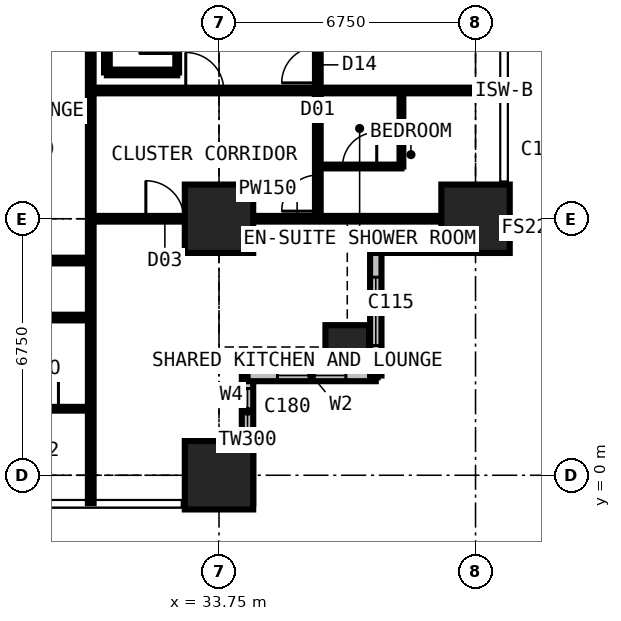
"""IFC4 building model, lengths in metres.
Left out: names, types, materials, properties, quantities, classifications, styles, units other than length and angle.
Written with IfcOpenShell. Run it as: python <this file> out.ifc"""

import sys

from ifc_helpers import new_model, si_unit, direction, frame, frame_2d, origin, origin_2d, place, context, subcontext, project, spatial, rectangle, extrude, element, fill, save


model = new_model("IFC4")
c1 = context("Model", 3, precision=1e-05, world=origin(), true_north=direction((0.0, 1.0)))
c2 = subcontext(c1, "Body", "Model", "MODEL_VIEW")
j1 = project(units=[si_unit("LENGTHUNIT", "METRE"), si_unit("PLANEANGLEUNIT", "RADIAN")], contexts=[c1])
p1 = place(None, origin())
s1 = spatial("IfcSite", under=j1, at=p1, CompositionType="ELEMENT")
p2 = place(p1, origin())
s2 = spatial("IfcBuilding", under=s1, at=p2, CompositionType="ELEMENT")
p3 = place(p2, frame((0.0, 0.0, 94.5)))
s3 = spatial("IfcBuildingStorey", under=s2, at=p3, CompositionType="ELEMENT", Elevation=94.5)
for number, where, z_axis, x_axis in (
    (1, (33.75, 0.0, 0.0), (0.0, 0.0, 1.0), (1.0, 0.0, 0.0)),
    (2, (33.75, 6.75, 0.0), (0.0, 0.0, 1.0), (1.0, 0.0, 0.0)),
):
    element("IfcColumn", number, at=place(p3, frame(where, z_axis=z_axis, x_axis=x_axis)), inside=s3, PredefinedType="COLUMN", context=c2, shape_type="SweptSolid", body=[
        extrude(rectangle(XDim=1.8, YDim=1.8, at=origin_2d()), origin(), (0.0, 0.0, 1.0), 3.6),
    ])
p4 = place(p3, frame((37.125, 3.375, 0.0), z_axis=(0.0, 0.0, 1.0), x_axis=(1.0, 0.0, 0.0)))
e3 = element("IfcColumn", 3, at=p4, inside=s3, PredefinedType="COLUMN", context=c2, shape_type="SweptSolid", body=[
    extrude(rectangle(XDim=1.15, YDim=1.15, at=origin_2d()), origin(), (0.0, 0.0, 1.0), 3.6),
])
p5 = place(p3, frame((40.5, 6.75, 0.0), z_axis=(0.0, 0.0, 1.0), x_axis=(1.0, 0.0, 0.0)))
e4 = element("IfcColumn", 4, at=p5, inside=s3, PredefinedType="COLUMN", context=c2, shape_type="SweptSolid", body=[
    extrude(rectangle(XDim=1.8, YDim=1.8, at=origin_2d()), origin(), (0.0, 0.0, 1.0), 3.6),
])
p6 = place(p3, frame((34.5, -0.75, 0.0), z_axis=(0.0, 0.0, 1.0), x_axis=(0.0, 1.0, 0.0)))
e5 = element("IfcWall", 5, at=p6, inside=s3, PredefinedType="SOLIDWALL", context=c2, shape_type="SweptSolid", body=[
    extrude(rectangle(XDim=3.375, YDim=0.3, at=frame_2d((1.688, 0.0))), origin(), (0.0, 0.0, 1.0), 3.375),
])
p7 = place(p6, frame((1.833, 0.0, 0.9)))
e6 = element("IfcOpeningElement", 6, at=p7, cuts=e5, PredefinedType="OPENING", context=c2, shape_type="SweptSolid", body=[
    extrude(rectangle(XDim=1.2, YDim=1.8, at=frame_2d((0.6, 0.9))), frame((0.0, 0.16, 0.0), z_axis=(0.0, -1.0, 0.0), x_axis=(1.0, 0.0, 0.0)), (0.0, 0.0, 1.0), 0.32),
])
p8 = place(p3, frame((34.5, 2.625, 0.0), z_axis=(0.0, 0.0, 1.0), x_axis=(1.0, 0.0, 0.0)))
e7 = element("IfcWall", 7, at=p8, inside=s3, PredefinedType="SOLIDWALL", context=c2, shape_type="SweptSolid", body=[
    extrude(rectangle(XDim=3.375, YDim=0.3, at=frame_2d((1.688, 0.0))), origin(), (0.0, 0.0, 1.0), 3.375),
])
p9 = place(p8, frame((0.788, 0.0, 0.6)))
e8 = element("IfcOpeningElement", 8, at=p9, cuts=e7, PredefinedType="OPENING", context=c2, shape_type="SweptSolid", body=[
    extrude(rectangle(XDim=1.8, YDim=2.1, at=frame_2d((0.9, 1.05))), frame((0.0, 0.16, 0.0), z_axis=(0.0, -1.0, 0.0), x_axis=(1.0, 0.0, 0.0)), (0.0, 0.0, 1.0), 0.32),
])
p10 = place(p3, frame((37.875, 2.625, 0.0), z_axis=(0.0, 0.0, 1.0), x_axis=(0.0, 1.0, 0.0)))
e9 = element("IfcWall", 9, at=p10, inside=s3, PredefinedType="SOLIDWALL", context=c2, shape_type="SweptSolid", body=[
    extrude(rectangle(XDim=3.375, YDim=0.3, at=frame_2d((1.688, 0.0))), origin(), (0.0, 0.0, 1.0), 3.375),
])
p11 = place(p10, frame((0.788, 0.0, 0.6)))
e10 = element("IfcOpeningElement", 10, at=p11, cuts=e9, PredefinedType="OPENING", context=c2, shape_type="SweptSolid", body=[
    extrude(rectangle(XDim=1.8, YDim=2.1, at=frame_2d((0.9, 1.05))), frame((0.0, 0.16, 0.0), z_axis=(0.0, -1.0, 0.0), x_axis=(1.0, 0.0, 0.0)), (0.0, 0.0, 1.0), 0.32),
])
p12 = place(p3, frame((37.875, 6.0, 0.0), z_axis=(0.0, 0.0, 1.0), x_axis=(1.0, 0.0, 0.0)))
e11 = element("IfcWall", 11, at=p12, inside=s3, PredefinedType="SOLIDWALL", context=c2, shape_type="SweptSolid", body=[
    extrude(rectangle(XDim=3.375, YDim=0.3, at=frame_2d((1.688, 0.0))), origin(), (0.0, 0.0, 1.0), 3.375),
])
p13 = place(p12, frame((0.343, 0.0, 0.9)))
e12 = element("IfcOpeningElement", 12, at=p13, cuts=e11, PredefinedType="OPENING", context=c2, shape_type="SweptSolid", body=[
    extrude(rectangle(XDim=1.2, YDim=1.8, at=frame_2d((0.6, 0.9))), frame((0.0, 0.16, 0.0), z_axis=(0.0, -1.0, 0.0), x_axis=(1.0, 0.0, 0.0)), (0.0, 0.0, 1.0), 0.32),
])
p14 = place(p3, frame((6.75, 4.15, 0.0), z_axis=(0.0, 0.0, 1.0), x_axis=(1.0, 0.0, 0.0)))
e13 = element("IfcWall", 13, at=p14, inside=s3, PredefinedType="PARTITIONING", context=c2, shape_type="SweptSolid", body=[
    extrude(rectangle(XDim=23.625, YDim=0.15, at=frame_2d((11.812, 0.0))), origin(), (0.0, 0.0, 1.0), 3.375),
])
p15 = place(p14, frame((2.85, 0.0, 0.0)))
e14 = element("IfcOpeningElement", 14, at=p15, cuts=e13, PredefinedType="OPENING", context=c2, shape_type="SweptSolid", body=[
    extrude(rectangle(XDim=1.0, YDim=2.2, at=frame_2d((0.5, 1.1))), frame((0.0, 0.085, 0.0), z_axis=(0.0, -1.0, 0.0), x_axis=(1.0, 0.0, 0.0)), (0.0, 0.0, 1.0), 0.17),
])
p16 = place(p14, frame((18.475, 0.0, 0.0)))
e15 = element("IfcOpeningElement", 15, at=p16, cuts=e13, PredefinedType="OPENING", context=c2, shape_type="SweptSolid", body=[
    extrude(rectangle(XDim=0.95, YDim=2.2, at=frame_2d((0.475, 1.1))), frame((0.0, 0.085, 0.0), z_axis=(0.0, -1.0, 0.0), x_axis=(1.0, 0.0, 0.0)), (0.0, 0.0, 1.0), 0.17),
])
p17 = place(p14, frame((11.725, 0.0, 0.0)))
e16 = element("IfcOpeningElement", 16, at=p17, cuts=e13, PredefinedType="OPENING", context=c2, shape_type="SweptSolid", body=[
    extrude(rectangle(XDim=0.95, YDim=2.2, at=frame_2d((0.475, 1.1))), frame((0.0, 0.085, 0.0), z_axis=(0.0, -1.0, 0.0), x_axis=(1.0, 0.0, 0.0)), (0.0, 0.0, 1.0), 0.17),
])
p18 = place(p14, frame((6.95, 0.0, 0.0)))
e17 = element("IfcOpeningElement", 17, at=p18, cuts=e13, PredefinedType="OPENING", context=c2, shape_type="SweptSolid", body=[
    extrude(rectangle(XDim=0.95, YDim=2.2, at=frame_2d((0.475, 1.1))), frame((0.0, 0.085, 0.0), z_axis=(0.0, -1.0, 0.0), x_axis=(1.0, 0.0, 0.0)), (0.0, 0.0, 1.0), 0.17),
])
p19 = place(p3, frame((22.988, 5.65, 0.0), z_axis=(0.0, 0.0, 1.0), x_axis=(1.0, 0.0, 0.0)))
e18 = element("IfcWall", 18, at=p19, inside=s3, PredefinedType="PARTITIONING", context=c2, shape_type="SweptSolid", body=[
    extrude(rectangle(XDim=7.387, YDim=0.15, at=frame_2d((3.694, 0.0))), origin(), (0.0, 0.0, 1.0), 3.375),
])
p20 = place(p19, frame((2.15, 0.0, 0.0)))
e19 = element("IfcOpeningElement", 19, at=p20, cuts=e18, PredefinedType="OPENING", context=c2, shape_type="SweptSolid", body=[
    extrude(rectangle(XDim=0.95, YDim=2.2, at=frame_2d((0.475, 1.1))), frame((0.0, 0.085, 0.0), z_axis=(0.0, -1.0, 0.0), x_axis=(1.0, 0.0, 0.0)), (0.0, 0.0, 1.0), 0.17),
])
p21 = place(p3, frame((27.775, 1.75, 0.0), z_axis=(0.0, 0.0, 1.0), x_axis=(1.0, 0.0, 0.0)))
e20 = element("IfcWall", 20, at=p21, inside=s3, PredefinedType="PARTITIONING", context=c2, shape_type="SweptSolid", body=[
    extrude(rectangle(XDim=2.6, YDim=0.1, at=frame_2d((1.3, 0.0))), origin(), (0.0, 0.0, 1.0), 3.375),
])
p22 = place(p21, frame((0.85, 0.0, 0.0)))
e21 = element("IfcOpeningElement", 21, at=p22, cuts=e20, PredefinedType="OPENING", context=c2, shape_type="SweptSolid", body=[
    extrude(rectangle(XDim=0.9, YDim=2.2, at=frame_2d((0.45, 1.1))), frame((0.0, 0.06, 0.0), z_axis=(0.0, -1.0, 0.0), x_axis=(1.0, 0.0, 0.0)), (0.0, 0.0, 1.0), 0.12),
])
p23 = place(p3, frame((30.375, -0.734, 0.0), z_axis=(0.0, 0.0, 1.0), x_axis=(0.0, 1.0, 0.0)))
e22 = element("IfcWall", 22, at=p23, inside=s3, PredefinedType="PARTITIONING", context=c2, shape_type="SweptSolid", body=[
    extrude(rectangle(XDim=12.034, YDim=0.15, at=frame_2d((6.017, 0.0))), origin(), (0.0, 0.0, 1.0), 3.375),
])
p24 = place(p3, frame((30.375, 6.75, 0.0), z_axis=(0.0, 0.0, 1.0), x_axis=(1.0, 0.0, 0.0)))
e23 = element("IfcWall", 23, at=p24, inside=s3, PredefinedType="PARTITIONING", context=c2, shape_type="SweptSolid", body=[
    extrude(rectangle(XDim=10.859, YDim=0.15, at=frame_2d((5.429, 0.0))), origin(), (0.0, 0.0, 1.0), 2.877),
])
p25 = place(p24, frame((1.45, 0.0, 0.0)))
e24 = element("IfcOpeningElement", 24, at=p25, cuts=e23, PredefinedType="OPENING", context=c2, shape_type="SweptSolid", body=[
    extrude(rectangle(XDim=1.0, YDim=2.2, at=frame_2d((0.5, 1.1))), frame((0.0, 0.085, 0.0), z_axis=(0.0, -1.0, 0.0), x_axis=(1.0, 0.0, 0.0)), (0.0, 0.0, 1.0), 0.17),
])
p26 = place(p3, frame((30.375, 10.125, 0.0), z_axis=(0.0, 0.0, 1.0), x_axis=(1.0, 0.0, 0.0)))
e25 = element("IfcWall", 25, at=p26, inside=s3, PredefinedType="PARTITIONING", context=c2, shape_type="SweptSolid", body=[
    extrude(rectangle(XDim=10.859, YDim=0.15, at=frame_2d((5.429, 0.0))), origin(), (0.0, 0.0, 1.0), 3.375),
])
p27 = place(p26, frame((2.5, 0.0, 0.0)))
e26 = element("IfcOpeningElement", 26, at=p27, cuts=e25, PredefinedType="OPENING", context=c2, shape_type="SweptSolid", body=[
    extrude(rectangle(XDim=1.0, YDim=2.2, at=frame_2d((0.5, 1.1))), frame((0.0, 0.085, 0.0), z_axis=(0.0, -1.0, 0.0), x_axis=(1.0, 0.0, 0.0)), (0.0, 0.0, 1.0), 0.17),
])
p28 = place(p3, frame((30.8, 10.6, 0.0), z_axis=(0.0, 0.0, 1.0), x_axis=(0.0, 1.0, 0.0)))
e27 = element("IfcWall", 27, at=p28, inside=s3, PredefinedType="PARTITIONING", context=c2, shape_type="SweptSolid", body=[
    extrude(rectangle(XDim=0.7, YDim=0.15, at=frame_2d((0.35, 0.0))), origin(), (0.0, 0.0, 1.0), 3.375),
])
p29 = place(p3, frame((30.8, 10.6, 0.0), z_axis=(0.0, 0.0, 1.0), x_axis=(1.0, 0.0, 0.0)))
e28 = element("IfcWall", 28, at=p29, inside=s3, PredefinedType="PARTITIONING", context=c2, shape_type="SweptSolid", body=[
    extrude(rectangle(XDim=1.85, YDim=0.15, at=frame_2d((0.925, 0.0))), origin(), (0.0, 0.0, 1.0), 3.375),
])
p30 = place(p3, frame((32.65, 10.6, 0.0), z_axis=(0.0, 0.0, 1.0), x_axis=(0.0, 1.0, 0.0)))
e29 = element("IfcWall", 29, at=p30, inside=s3, PredefinedType="SHEAR", context=c2, shape_type="SweptSolid", body=[
    extrude(rectangle(XDim=9.3, YDim=0.1, at=frame_2d((4.65, 0.0))), origin(), (0.0, 0.0, 1.0), 3.375),
])
p31 = place(p30, frame((0.5, 0.0, 0.0)))
e30 = element("IfcOpeningElement", 30, at=p31, cuts=e29, PredefinedType="OPENING", context=c2, shape_type="SweptSolid", body=[
    extrude(rectangle(XDim=1.0, YDim=2.2, at=frame_2d((0.5, 1.1))), frame((0.0, 0.06, 0.0), z_axis=(0.0, -1.0, 0.0), x_axis=(1.0, 0.0, 0.0)), (0.0, 0.0, 1.0), 0.12),
])
p32 = place(p3, frame((36.35, 6.75, 0.0), z_axis=(0.0, 0.0, 1.0), x_axis=(0.0, 1.0, 0.0)))
e31 = element("IfcWall", 31, at=p32, inside=s3, PredefinedType="PARTITIONING", context=c2, shape_type="SweptSolid", body=[
    extrude(rectangle(XDim=20.25, YDim=0.15, at=frame_2d((10.125, 0.0))), origin(), (0.0, 0.0, 1.0), 3.375),
])
p33 = place(p32, frame((0.2, 0.0, 0.0)))
e32 = element("IfcOpeningElement", 32, at=p33, cuts=e31, PredefinedType="OPENING", context=c2, shape_type="SweptSolid", body=[
    extrude(rectangle(XDim=0.95, YDim=2.2, at=frame_2d((0.475, 1.1))), frame((0.0, 0.085, 0.0), z_axis=(0.0, -1.0, 0.0), x_axis=(1.0, 0.0, 0.0)), (0.0, 0.0, 1.0), 0.17),
])
p34 = place(p32, frame((3.575, 0.0, 0.0)))
e33 = element("IfcOpeningElement", 33, at=p34, cuts=e31, PredefinedType="OPENING", context=c2, shape_type="SweptSolid", body=[
    extrude(rectangle(XDim=0.95, YDim=2.2, at=frame_2d((0.475, 1.1))), frame((0.0, 0.085, 0.0), z_axis=(0.0, -1.0, 0.0), x_axis=(1.0, 0.0, 0.0)), (0.0, 0.0, 1.0), 0.17),
])
p35 = place(p32, frame((7.0, 0.0, 0.0)))
e34 = element("IfcOpeningElement", 34, at=p35, cuts=e31, PredefinedType="OPENING", context=c2, shape_type="SweptSolid", body=[
    extrude(rectangle(XDim=0.95, YDim=2.2, at=frame_2d((0.475, 1.1))), frame((0.0, 0.085, 0.0), z_axis=(0.0, -1.0, 0.0), x_axis=(1.0, 0.0, 0.0)), (0.0, 0.0, 1.0), 0.17),
])
p36 = place(p32, frame((10.375, 0.0, 0.0)))
e35 = element("IfcOpeningElement", 35, at=p36, cuts=e31, PredefinedType="OPENING", context=c2, shape_type="SweptSolid", body=[
    extrude(rectangle(XDim=0.95, YDim=2.2, at=frame_2d((0.475, 1.1))), frame((0.0, 0.085, 0.0), z_axis=(0.0, -1.0, 0.0), x_axis=(1.0, 0.0, 0.0)), (0.0, 0.0, 1.0), 0.17),
])
p37 = place(p32, frame((13.75, 0.0, 0.0)))
e36 = element("IfcOpeningElement", 36, at=p37, cuts=e31, PredefinedType="OPENING", context=c2, shape_type="SweptSolid", body=[
    extrude(rectangle(XDim=0.95, YDim=2.2, at=frame_2d((0.475, 1.1))), frame((0.0, 0.085, 0.0), z_axis=(0.0, -1.0, 0.0), x_axis=(1.0, 0.0, 0.0)), (0.0, 0.0, 1.0), 0.17),
])
p38 = place(p32, frame((17.125, 0.0, 0.0)))
e37 = element("IfcOpeningElement", 37, at=p38, cuts=e31, PredefinedType="OPENING", context=c2, shape_type="SweptSolid", body=[
    extrude(rectangle(XDim=0.95, YDim=2.2, at=frame_2d((0.475, 1.1))), frame((0.0, 0.085, 0.0), z_axis=(0.0, -1.0, 0.0), x_axis=(1.0, 0.0, 0.0)), (0.0, 0.0, 1.0), 0.17),
])
p39 = place(p3, frame((36.35, 8.125, 0.0), z_axis=(0.0, 0.0, 1.0), x_axis=(1.0, 0.0, 0.0)))
e38 = element("IfcWall", 38, at=p39, inside=s3, PredefinedType="PARTITIONING", context=c2, shape_type="SweptSolid", body=[
    extrude(rectangle(XDim=2.2, YDim=0.1, at=frame_2d((1.1, 0.0))), origin(), (0.0, 0.0, 1.0), 3.375),
])
p40 = place(p39, frame((0.65, 0.0, 0.0)))
e39 = element("IfcOpeningElement", 39, at=p40, cuts=e38, PredefinedType="OPENING", context=c2, shape_type="SweptSolid", body=[
    extrude(rectangle(XDim=0.9, YDim=2.2, at=frame_2d((0.45, 1.1))), frame((0.0, 0.06, 0.0), z_axis=(0.0, -1.0, 0.0), x_axis=(1.0, 0.0, 0.0)), (0.0, 0.0, 1.0), 0.12),
])
p41 = place(p3, frame((38.55, 8.125, 0.0), z_axis=(0.0, 0.0, 1.0), x_axis=(0.0, 1.0, 0.0)))
e40 = element("IfcWall", 40, at=p41, inside=s3, PredefinedType="PARTITIONING", context=c2, shape_type="SweptSolid", body=[
    extrude(rectangle(XDim=2.0, YDim=0.1, at=frame_2d((1.0, 0.0))), origin(), (0.0, 0.0, 1.0), 3.375),
])
p42 = place(p7, origin())
e41 = element("IfcWindow", 41, at=p42, inside=s3, PartitioningType="SINGLE_PANEL", PredefinedType="WINDOW", context=c2, shape_type="SweptSolid", body=[
    extrude(rectangle(XDim=1.2, YDim=1.8, at=frame_2d((0.6, 0.9))), frame((0.0, 0.03, 0.0), z_axis=(0.0, -1.0, 0.0), x_axis=(1.0, 0.0, 0.0)), (0.0, 0.0, 1.0), 0.06),
])
fill(e6, e41)
p43 = place(p9, origin())
e42 = element("IfcWindow", 42, at=p43, inside=s3, PartitioningType="SINGLE_PANEL", PredefinedType="WINDOW", context=c2, shape_type="SweptSolid", body=[
    extrude(rectangle(XDim=1.8, YDim=2.1, at=frame_2d((0.9, 1.05))), frame((0.0, 0.03, 0.0), z_axis=(0.0, -1.0, 0.0), x_axis=(1.0, 0.0, 0.0)), (0.0, 0.0, 1.0), 0.06),
])
fill(e8, e42)
p44 = place(p11, origin())
e43 = element("IfcWindow", 43, at=p44, inside=s3, PartitioningType="SINGLE_PANEL", PredefinedType="WINDOW", context=c2, shape_type="SweptSolid", body=[
    extrude(rectangle(XDim=1.8, YDim=2.1, at=frame_2d((0.9, 1.05))), frame((0.0, 0.03, 0.0), z_axis=(0.0, -1.0, 0.0), x_axis=(1.0, 0.0, 0.0)), (0.0, 0.0, 1.0), 0.06),
])
fill(e10, e43)
p45 = place(p13, origin())
e44 = element("IfcWindow", 44, at=p45, inside=s3, PartitioningType="SINGLE_PANEL", PredefinedType="WINDOW", context=c2, shape_type="SweptSolid", body=[
    extrude(rectangle(XDim=1.2, YDim=1.8, at=frame_2d((0.6, 0.9))), frame((0.0, 0.03, 0.0), z_axis=(0.0, -1.0, 0.0), x_axis=(1.0, 0.0, 0.0)), (0.0, 0.0, 1.0), 0.06),
])
fill(e12, e44)
p46 = place(p22, origin())
e45 = element("IfcDoor", 45, at=p46, inside=s3, OperationType="SINGLE_SWING_RIGHT", PredefinedType="DOOR", context=c2, shape_type="SweptSolid", body=[
    extrude(rectangle(XDim=0.9, YDim=2.2, at=frame_2d((0.45, 1.1))), frame((0.0, 0.025, 0.0), z_axis=(0.0, -1.0, 0.0), x_axis=(1.0, 0.0, 0.0)), (0.0, 0.0, 1.0), 0.05),
])
fill(e21, e45)
p47 = place(p25, origin())
e46 = element("IfcDoor", 46, at=p47, inside=s3, OperationType="SINGLE_SWING_LEFT", PredefinedType="DOOR", context=c2, shape_type="SweptSolid", body=[
    extrude(rectangle(XDim=1.0, YDim=2.2, at=frame_2d((0.5, 1.1))), frame((0.0, 0.025, 0.0), z_axis=(0.0, -1.0, 0.0), x_axis=(1.0, 0.0, 0.0)), (0.0, 0.0, 1.0), 0.05),
])
fill(e24, e46)
p48 = place(p33, origin())
e47 = element("IfcDoor", 47, at=p48, inside=s3, OperationType="SINGLE_SWING_LEFT", PredefinedType="DOOR", context=c2, shape_type="SweptSolid", body=[
    extrude(rectangle(XDim=0.95, YDim=2.2, at=frame_2d((0.475, 1.1))), frame((0.0, 0.025, 0.0), z_axis=(0.0, -1.0, 0.0), x_axis=(1.0, 0.0, 0.0)), (0.0, 0.0, 1.0), 0.05),
])
fill(e32, e47)
p49 = place(p40, origin())
e48 = element("IfcDoor", 48, at=p49, inside=s3, OperationType="SINGLE_SWING_RIGHT", PredefinedType="DOOR", context=c2, shape_type="SweptSolid", body=[
    extrude(rectangle(XDim=0.9, YDim=2.2, at=frame_2d((0.45, 1.1))), frame((0.0, 0.025, 0.0), z_axis=(0.0, -1.0, 0.0), x_axis=(1.0, 0.0, 0.0)), (0.0, 0.0, 1.0), 0.05),
])
fill(e39, e48)
p50 = place(p27, origin())
e49 = element("IfcDoor", 49, at=p50, inside=s3, OperationType="SINGLE_SWING_LEFT", PredefinedType="DOOR", context=c2, shape_type="SweptSolid", body=[
    extrude(rectangle(XDim=1.0, YDim=2.2, at=frame_2d((0.5, 1.1))), frame((0.0, 0.025, 0.0), z_axis=(0.0, -1.0, 0.0), x_axis=(1.0, 0.0, 0.0)), (0.0, 0.0, 1.0), 0.05),
])
fill(e26, e49)
p51 = place(p34, origin())
e50 = element("IfcDoor", 50, at=p51, inside=s3, OperationType="SINGLE_SWING_LEFT", PredefinedType="DOOR", context=c2, shape_type="SweptSolid", body=[
    extrude(rectangle(XDim=0.95, YDim=2.2, at=frame_2d((0.475, 1.1))), frame((0.0, 0.025, 0.0), z_axis=(0.0, -1.0, 0.0), x_axis=(1.0, 0.0, 0.0)), (0.0, 0.0, 1.0), 0.05),
])
fill(e33, e50)
p52 = place(p31, origin())
e51 = element("IfcDoor", 51, at=p52, inside=s3, OperationType="SINGLE_SWING_LEFT", PredefinedType="DOOR", context=c2, shape_type="SweptSolid", body=[
    extrude(rectangle(XDim=1.0, YDim=2.2, at=frame_2d((0.5, 1.1))), frame((0.0, 0.025, 0.0), z_axis=(0.0, -1.0, 0.0), x_axis=(1.0, 0.0, 0.0)), (0.0, 0.0, 1.0), 0.05),
])
fill(e30, e51)
save(model, sys.argv[1])
